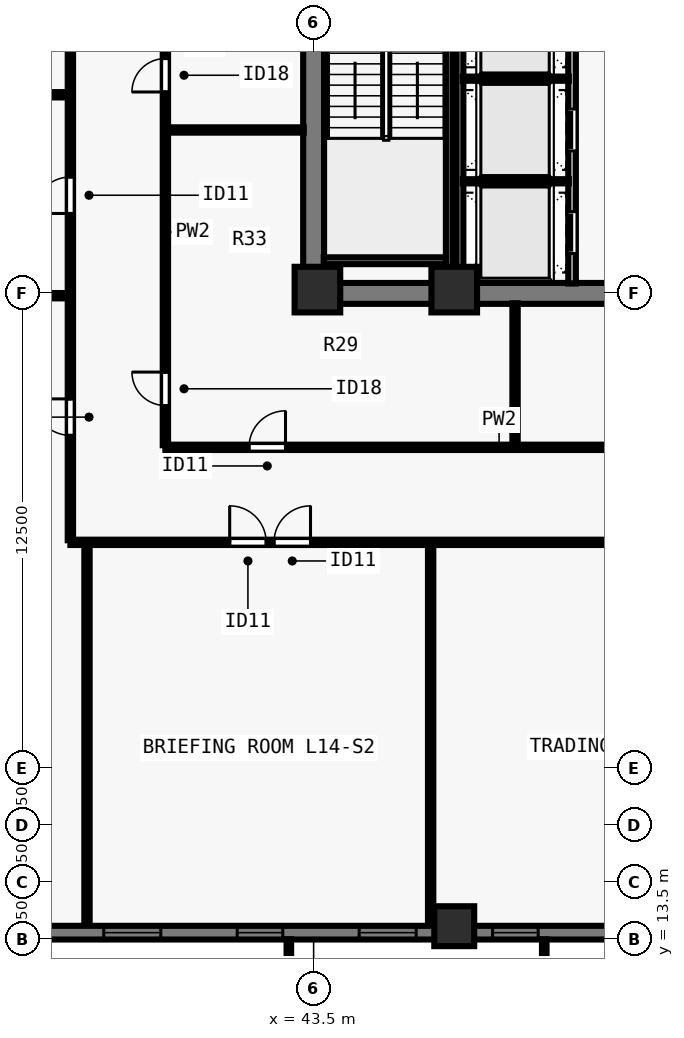
"""IFC4 building model, lengths in metres.
Left out: names, types, materials, properties, quantities, classifications, styles, units other than length and angle.
Written with IfcOpenShell. Run it as: python <this file> out.ifc"""

import sys

from ifc_helpers import new_model, si_unit, direction, frame, frame_2d, origin, origin_2d, place, context, subcontext, project, spatial, rectangle, extrude, element, fill, save


model = new_model("IFC4")
c1 = context("Model", 3, precision=1e-05, world=origin(), true_north=direction((0.0, 1.0)))
c2 = subcontext(c1, "Body", "Model", "MODEL_VIEW")
j1 = project(units=[si_unit("LENGTHUNIT", "METRE"), si_unit("PLANEANGLEUNIT", "RADIAN")], contexts=[c1])
p1 = place(None, origin())
s1 = spatial("IfcSite", under=j1, at=p1, CompositionType="ELEMENT")
p2 = place(p1, origin())
s2 = spatial("IfcBuilding", under=s1, at=p2, CompositionType="ELEMENT")
p3 = place(p2, frame((0.0, 0.0, 55.0)))
s3 = spatial("IfcBuildingStorey", under=s2, at=p3, CompositionType="ELEMENT", Elevation=55.0)
for number, where, z_axis, x_axis in (
    (1, (43.6, 30.6, 0.0), (0.0, 0.0, 1.0), (1.0, 0.0, 0.0)),
    (2, (47.2, 30.6, 0.0), (0.0, 0.0, 1.0), (1.0, 0.0, 0.0)),
):
    element("IfcColumn", number, at=place(p3, frame(where, z_axis=z_axis, x_axis=x_axis)), inside=s3, PredefinedType="COLUMN", context=c2, shape_type="SweptSolid", body=[
        extrude(rectangle(XDim=1.2, YDim=1.2, at=origin_2d()), origin(), (0.0, 0.0, 1.0), 3.5),
    ])
p4 = place(p3, frame((47.2, 13.85, 0.0), z_axis=(0.0, 0.0, 1.0), x_axis=(1.0, 0.0, 0.0)))
e3 = element("IfcColumn", 3, at=p4, inside=s3, PredefinedType="COLUMN", context=c2, shape_type="SweptSolid", body=[
    extrude(rectangle(XDim=1.05, YDim=1.05, at=origin_2d()), origin(), (0.0, 0.0, 1.0), 3.5),
])
p5 = place(p3, frame((74.5, 13.68, 0.0), z_axis=(0.0, 0.0, 1.0), x_axis=(-1.0, 0.0, 0.0)))
e4 = element("IfcWall", 4, at=p5, inside=s3, PredefinedType="SOLIDWALL", context=c2, shape_type="SweptSolid", body=[
    extrude(rectangle(XDim=44.662, YDim=0.36, at=frame_2d((22.331, 0.0))), origin(), (0.0, 0.0, 1.0), 3.28),
])
p6 = place(p5, frame((4.93, 0.0, 0.8)))
e5 = element("IfcOpeningElement", 5, at=p6, cuts=e4, PredefinedType="OPENING", context=c2, shape_type="SweptSolid", body=[
    extrude(rectangle(XDim=1.2, YDim=1.544, at=frame_2d((0.6, 0.772))), frame((0.0, 0.19, 0.0), z_axis=(0.0, -1.0, 0.0), x_axis=(1.0, 0.0, 0.0)), (0.0, 0.0, 1.0), 0.38),
])
p7 = place(p5, frame((8.59, 0.0, 0.8)))
e6 = element("IfcOpeningElement", 6, at=p7, cuts=e4, PredefinedType="OPENING", context=c2, shape_type="SweptSolid", body=[
    extrude(rectangle(XDim=1.5, YDim=1.544, at=frame_2d((0.75, 0.772))), frame((0.0, 0.19, 0.0), z_axis=(0.0, -1.0, 0.0), x_axis=(1.0, 0.0, 0.0)), (0.0, 0.0, 1.0), 0.38),
])
p8 = place(p5, frame((11.65, 0.0, 0.8)))
e7 = element("IfcOpeningElement", 7, at=p8, cuts=e4, PredefinedType="OPENING", context=c2, shape_type="SweptSolid", body=[
    extrude(rectangle(XDim=1.2, YDim=1.544, at=frame_2d((0.6, 0.772))), frame((0.0, 0.19, 0.0), z_axis=(0.0, -1.0, 0.0), x_axis=(1.0, 0.0, 0.0)), (0.0, 0.0, 1.0), 0.38),
])
p9 = place(p5, frame((14.861, 0.0, 0.8)))
e8 = element("IfcOpeningElement", 8, at=p9, cuts=e4, PredefinedType="OPENING", context=c2, shape_type="SweptSolid", body=[
    extrude(rectangle(XDim=1.5, YDim=1.544, at=frame_2d((0.75, 0.772))), frame((0.0, 0.19, 0.0), z_axis=(0.0, -1.0, 0.0), x_axis=(1.0, 0.0, 0.0)), (0.0, 0.0, 1.0), 0.38),
])
p10 = place(p5, frame((18.821, 0.0, 0.8)))
e9 = element("IfcOpeningElement", 9, at=p10, cuts=e4, PredefinedType="OPENING", context=c2, shape_type="SweptSolid", body=[
    extrude(rectangle(XDim=1.2, YDim=1.544, at=frame_2d((0.6, 0.772))), frame((0.0, 0.19, 0.0), z_axis=(0.0, -1.0, 0.0), x_axis=(1.0, 0.0, 0.0)), (0.0, 0.0, 1.0), 0.38),
])
p11 = place(p5, frame((21.581, 0.0, 0.8)))
e10 = element("IfcOpeningElement", 10, at=p11, cuts=e4, PredefinedType="OPENING", context=c2, shape_type="SweptSolid", body=[
    extrude(rectangle(XDim=1.5, YDim=1.544, at=frame_2d((0.75, 0.772))), frame((0.0, 0.19, 0.0), z_axis=(0.0, -1.0, 0.0), x_axis=(1.0, 0.0, 0.0)), (0.0, 0.0, 1.0), 0.38),
])
p12 = place(p5, frame((25.091, 0.0, 0.8)))
e11 = element("IfcOpeningElement", 11, at=p12, cuts=e4, PredefinedType="OPENING", context=c2, shape_type="SweptSolid", body=[
    extrude(rectangle(XDim=1.2, YDim=1.544, at=frame_2d((0.6, 0.772))), frame((0.0, 0.19, 0.0), z_axis=(0.0, -1.0, 0.0), x_axis=(1.0, 0.0, 0.0)), (0.0, 0.0, 1.0), 0.38),
])
p13 = place(p5, frame((28.302, 0.0, 0.8)))
e12 = element("IfcOpeningElement", 12, at=p13, cuts=e4, PredefinedType="OPENING", context=c2, shape_type="SweptSolid", body=[
    extrude(rectangle(XDim=1.5, YDim=1.544, at=frame_2d((0.75, 0.772))), frame((0.0, 0.19, 0.0), z_axis=(0.0, -1.0, 0.0), x_axis=(1.0, 0.0, 0.0)), (0.0, 0.0, 1.0), 0.38),
])
p14 = place(p5, frame((31.812, 0.0, 0.8)))
e13 = element("IfcOpeningElement", 13, at=p14, cuts=e4, PredefinedType="OPENING", context=c2, shape_type="SweptSolid", body=[
    extrude(rectangle(XDim=1.2, YDim=1.544, at=frame_2d((0.6, 0.772))), frame((0.0, 0.19, 0.0), z_axis=(0.0, -1.0, 0.0), x_axis=(1.0, 0.0, 0.0)), (0.0, 0.0, 1.0), 0.38),
])
p15 = place(p5, frame((35.022, 0.0, 0.8)))
e14 = element("IfcOpeningElement", 14, at=p15, cuts=e4, PredefinedType="OPENING", context=c2, shape_type="SweptSolid", body=[
    extrude(rectangle(XDim=1.5, YDim=1.544, at=frame_2d((0.75, 0.772))), frame((0.0, 0.19, 0.0), z_axis=(0.0, -1.0, 0.0), x_axis=(1.0, 0.0, 0.0)), (0.0, 0.0, 1.0), 0.38),
])
p16 = place(p5, frame((38.532, 0.0, 0.8)))
e15 = element("IfcOpeningElement", 15, at=p16, cuts=e4, PredefinedType="OPENING", context=c2, shape_type="SweptSolid", body=[
    extrude(rectangle(XDim=1.2, YDim=1.544, at=frame_2d((0.6, 0.772))), frame((0.0, 0.19, 0.0), z_axis=(0.0, -1.0, 0.0), x_axis=(1.0, 0.0, 0.0)), (0.0, 0.0, 1.0), 0.38),
])
p17 = place(p3, frame((43.225, 30.5, 0.0), z_axis=(0.0, 0.0, 1.0), x_axis=(1.0, 0.0, 0.0)))
e16 = element("IfcWall", 16, at=p17, inside=s3, PredefinedType="SHEAR", context=c2, shape_type="SweptSolid", body=[
    extrude(rectangle(XDim=17.55, YDim=0.55, at=frame_2d((8.775, 0.0))), origin(), (0.0, 0.0, 1.0), 3.28),
])
p18 = place(p3, frame((43.5, 30.765, 0.0), z_axis=(0.0, 0.0, 1.0), x_axis=(0.0, 1.0, 0.0)))
e17 = element("IfcWall", 17, at=p18, inside=s3, PredefinedType="SHEAR", context=c2, shape_type="SweptSolid", body=[
    extrude(rectangle(XDim=7.985, YDim=0.55, at=frame_2d((3.993, 0.0))), origin(), (0.0, 0.0, 1.0), 3.28),
])
p19 = place(p3, frame((50.3, 30.76, 0.0), z_axis=(0.0, 0.0, 1.0), x_axis=(0.0, 1.0, 0.0)))
e18 = element("IfcWall", 18, at=p19, inside=s3, PredefinedType="SOLIDWALL", context=c2, shape_type="SweptSolid", body=[
    extrude(rectangle(XDim=7.855, YDim=0.2, at=frame_2d((3.927, 0.0))), origin(), (0.0, 0.0, 1.0), 3.28),
])
p20 = place(p19, frame((0.79, 0.0, 0.0)))
e19 = element("IfcOpeningElement", 19, at=p20, cuts=e18, PredefinedType="OPENING", context=c2, shape_type="SweptSolid", body=[
    extrude(rectangle(XDim=1.1, YDim=2.2, at=frame_2d((0.55, 1.1))), frame((0.0, 0.11, 0.0), z_axis=(0.0, -1.0, 0.0), x_axis=(1.0, 0.0, 0.0)), (0.0, 0.0, 1.0), 0.22),
])
p21 = place(p19, frame((3.49, 0.0, 0.0)))
e20 = element("IfcOpeningElement", 20, at=p21, cuts=e18, PredefinedType="OPENING", context=c2, shape_type="SweptSolid", body=[
    extrude(rectangle(XDim=1.1, YDim=2.2, at=frame_2d((0.55, 1.1))), frame((0.0, 0.11, 0.0), z_axis=(0.0, -1.0, 0.0), x_axis=(1.0, 0.0, 0.0)), (0.0, 0.0, 1.0), 0.22),
])
p22 = place(p19, frame((6.19, 0.0, 0.0)))
e21 = element("IfcOpeningElement", 21, at=p22, cuts=e18, PredefinedType="OPENING", context=c2, shape_type="SweptSolid", body=[
    extrude(rectangle(XDim=1.1, YDim=2.2, at=frame_2d((0.55, 1.1))), frame((0.0, 0.11, 0.0), z_axis=(0.0, -1.0, 0.0), x_axis=(1.0, 0.0, 0.0)), (0.0, 0.0, 1.0), 0.22),
])
p23 = place(p3, frame((47.35, 30.76, 0.0), z_axis=(0.0, 0.0, 1.0), x_axis=(0.0, 1.0, 0.0)))
e22 = element("IfcWall", 22, at=p23, inside=s3, PredefinedType="SOLIDWALL", context=c2, shape_type="SweptSolid", body=[
    extrude(rectangle(XDim=7.855, YDim=0.18, at=frame_2d((3.927, 0.0))), origin(), (0.0, 0.0, 1.0), 3.28),
])
for number, where, z_axis, x_axis in (
    (23, (47.425, 33.45, 0.0), (0.0, 0.0, 1.0), (1.0, 0.0, 0.0)),
    (24, (47.425, 36.15, 0.0), (0.0, 0.0, 1.0), (1.0, 0.0, 0.0)),
):
    element("IfcWall", number, at=place(p3, frame(where, z_axis=z_axis, x_axis=x_axis)), inside=s3, PredefinedType="PARTITIONING", context=c2, shape_type="SweptSolid", body=[
        extrude(rectangle(XDim=2.79, YDim=0.11, at=frame_2d((1.395, 0.0))), origin(), (0.0, 0.0, 1.0), 3.28),
    ])
p24 = place(p3, frame((37.1, 23.95, 0.0), z_axis=(0.0, 0.0, 1.0), x_axis=(1.0, 0.0, 0.0)))
e25 = element("IfcWall", 25, at=p24, inside=s3, PredefinedType="PARTITIONING", context=c2, shape_type="SweptSolid", body=[
    extrude(rectangle(XDim=29.8, YDim=0.14, at=frame_2d((14.9, 0.0))), origin(), (0.0, 0.0, 1.0), 3.28),
])
p25 = place(p24, frame((4.191, 0.0, 0.0)))
e26 = element("IfcOpeningElement", 26, at=p25, cuts=e25, PredefinedType="OPENING", context=c2, shape_type="SweptSolid", body=[
    extrude(rectangle(XDim=0.96, YDim=2.12, at=frame_2d((0.48, 1.06))), frame((0.0, 0.08, 0.0), z_axis=(0.0, -1.0, 0.0), x_axis=(1.0, 0.0, 0.0)), (0.0, 0.0, 1.0), 0.16),
])
p26 = place(p24, frame((5.358, 0.0, 0.0)))
e27 = element("IfcOpeningElement", 27, at=p26, cuts=e25, PredefinedType="OPENING", context=c2, shape_type="SweptSolid", body=[
    extrude(rectangle(XDim=0.96, YDim=2.12, at=frame_2d((0.48, 1.06))), frame((0.0, 0.08, 0.0), z_axis=(0.0, -1.0, 0.0), x_axis=(1.0, 0.0, 0.0)), (0.0, 0.0, 1.0), 0.16),
])
p27 = place(p24, frame((14.51, 0.0, 0.0)))
e28 = element("IfcOpeningElement", 28, at=p27, cuts=e25, PredefinedType="OPENING", context=c2, shape_type="SweptSolid", body=[
    extrude(rectangle(XDim=0.96, YDim=2.12, at=frame_2d((0.48, 1.06))), frame((0.0, 0.08, 0.0), z_axis=(0.0, -1.0, 0.0), x_axis=(1.0, 0.0, 0.0)), (0.0, 0.0, 1.0), 0.16),
])
p28 = place(p24, frame((24.542, 0.0, 0.0)))
e29 = element("IfcOpeningElement", 29, at=p28, cuts=e25, PredefinedType="OPENING", context=c2, shape_type="SweptSolid", body=[
    extrude(rectangle(XDim=0.96, YDim=2.12, at=frame_2d((0.48, 1.06))), frame((0.0, 0.08, 0.0), z_axis=(0.0, -1.0, 0.0), x_axis=(1.0, 0.0, 0.0)), (0.0, 0.0, 1.0), 0.16),
])
p29 = place(p24, frame((28.26, 0.0, 0.0)))
e30 = element("IfcOpeningElement", 30, at=p29, cuts=e25, PredefinedType="OPENING", context=c2, shape_type="SweptSolid", body=[
    extrude(rectangle(XDim=0.96, YDim=2.12, at=frame_2d((0.48, 1.06))), frame((0.0, 0.08, 0.0), z_axis=(0.0, -1.0, 0.0), x_axis=(1.0, 0.0, 0.0)), (0.0, 0.0, 1.0), 0.16),
])
p30 = place(p3, frame((37.1, 24.005, 0.0), z_axis=(0.0, 0.0, 1.0), x_axis=(0.0, 1.0, 0.0)))
e31 = element("IfcWall", 31, at=p30, inside=s3, PredefinedType="PARTITIONING", context=c2, shape_type="SweptSolid", body=[
    extrude(rectangle(XDim=29.99, YDim=0.14, at=frame_2d((14.995, 0.0))), origin(), (0.0, 0.0, 1.0), 3.28),
])
p31 = place(p30, frame((2.76, 0.0, 0.0)))
e32 = element("IfcOpeningElement", 32, at=p31, cuts=e31, PredefinedType="OPENING", context=c2, shape_type="SweptSolid", body=[
    extrude(rectangle(XDim=0.96, YDim=2.12, at=frame_2d((0.48, 1.06))), frame((0.0, 0.08, 0.0), z_axis=(0.0, -1.0, 0.0), x_axis=(1.0, 0.0, 0.0)), (0.0, 0.0, 1.0), 0.16),
])
p32 = place(p30, frame((8.598, 0.0, 0.0)))
e33 = element("IfcOpeningElement", 33, at=p32, cuts=e31, PredefinedType="OPENING", context=c2, shape_type="SweptSolid", body=[
    extrude(rectangle(XDim=0.96, YDim=2.12, at=frame_2d((0.48, 1.06))), frame((0.0, 0.08, 0.0), z_axis=(0.0, -1.0, 0.0), x_axis=(1.0, 0.0, 0.0)), (0.0, 0.0, 1.0), 0.16),
])
p33 = place(p30, frame((14.578, 0.0, 0.0)))
e34 = element("IfcOpeningElement", 34, at=p33, cuts=e31, PredefinedType="OPENING", context=c2, shape_type="SweptSolid", body=[
    extrude(rectangle(XDim=0.96, YDim=2.12, at=frame_2d((0.48, 1.06))), frame((0.0, 0.08, 0.0), z_axis=(0.0, -1.0, 0.0), x_axis=(1.0, 0.0, 0.0)), (0.0, 0.0, 1.0), 0.16),
])
p34 = place(p30, frame((20.558, 0.0, 0.0)))
e35 = element("IfcOpeningElement", 35, at=p34, cuts=e31, PredefinedType="OPENING", context=c2, shape_type="SweptSolid", body=[
    extrude(rectangle(XDim=0.96, YDim=2.12, at=frame_2d((0.48, 1.06))), frame((0.0, 0.08, 0.0), z_axis=(0.0, -1.0, 0.0), x_axis=(1.0, 0.0, 0.0)), (0.0, 0.0, 1.0), 0.16),
])
p35 = place(p30, frame((26.333, 0.0, 0.0)))
e36 = element("IfcOpeningElement", 36, at=p35, cuts=e31, PredefinedType="OPENING", context=c2, shape_type="SweptSolid", body=[
    extrude(rectangle(XDim=0.96, YDim=2.12, at=frame_2d((0.48, 1.06))), frame((0.0, 0.08, 0.0), z_axis=(0.0, -1.0, 0.0), x_axis=(1.0, 0.0, 0.0)), (0.0, 0.0, 1.0), 0.16),
])
p36 = place(p3, frame((39.6, 26.45, 0.0), z_axis=(0.0, 0.0, 1.0), x_axis=(1.0, 0.0, 0.0)))
e37 = element("IfcWall", 37, at=p36, inside=s3, PredefinedType="PARTITIONING", context=c2, shape_type="SweptSolid", body=[
    extrude(rectangle(XDim=24.8, YDim=0.14, at=frame_2d((12.4, 0.0))), origin(), (0.0, 0.0, 1.0), 3.28),
])
p37 = place(p36, frame((2.2, 0.0, 0.0)))
e38 = element("IfcOpeningElement", 38, at=p37, cuts=e37, PredefinedType="OPENING", context=c2, shape_type="SweptSolid", body=[
    extrude(rectangle(XDim=0.96, YDim=2.12, at=frame_2d((0.48, 1.06))), frame((0.0, 0.08, 0.0), z_axis=(0.0, -1.0, 0.0), x_axis=(1.0, 0.0, 0.0)), (0.0, 0.0, 1.0), 0.16),
])
p38 = place(p36, frame((14.4, 0.0, 0.0)))
e39 = element("IfcOpeningElement", 39, at=p38, cuts=e37, PredefinedType="OPENING", context=c2, shape_type="SweptSolid", body=[
    extrude(rectangle(XDim=0.96, YDim=2.12, at=frame_2d((0.48, 1.06))), frame((0.0, 0.08, 0.0), z_axis=(0.0, -1.0, 0.0), x_axis=(1.0, 0.0, 0.0)), (0.0, 0.0, 1.0), 0.16),
])
p39 = place(p3, frame((39.6, 26.505, 0.0), z_axis=(0.0, 0.0, 1.0), x_axis=(0.0, 1.0, 0.0)))
e40 = element("IfcWall", 40, at=p39, inside=s3, PredefinedType="PARTITIONING", context=c2, shape_type="SweptSolid", body=[
    extrude(rectangle(XDim=12.245, YDim=0.14, at=frame_2d((6.123, 0.0))), origin(), (0.0, 0.0, 1.0), 3.28),
])
p40 = place(p39, frame((1.045, 0.0, 0.0)))
e41 = element("IfcOpeningElement", 41, at=p40, cuts=e40, PredefinedType="OPENING", context=c2, shape_type="SweptSolid", body=[
    extrude(rectangle(XDim=0.88, YDim=2.1, at=frame_2d((0.44, 1.05))), frame((0.0, 0.08, 0.0), z_axis=(0.0, -1.0, 0.0), x_axis=(1.0, 0.0, 0.0)), (0.0, 0.0, 1.0), 0.16),
])
p41 = place(p39, frame((9.295, 0.0, 0.0)))
e42 = element("IfcOpeningElement", 42, at=p41, cuts=e40, PredefinedType="OPENING", context=c2, shape_type="SweptSolid", body=[
    extrude(rectangle(XDim=0.88, YDim=2.1, at=frame_2d((0.44, 1.05))), frame((0.0, 0.08, 0.0), z_axis=(0.0, -1.0, 0.0), x_axis=(1.0, 0.0, 0.0)), (0.0, 0.0, 1.0), 0.16),
])
p42 = place(p3, frame((48.8, 26.505, 0.0), z_axis=(0.0, 0.0, 1.0), x_axis=(0.0, 1.0, 0.0)))
e43 = element("IfcWall", 43, at=p42, inside=s3, PredefinedType="PARTITIONING", context=c2, shape_type="SweptSolid", body=[
    extrude(rectangle(XDim=3.735, YDim=0.14, at=frame_2d((1.868, 0.0))), origin(), (0.0, 0.0, 1.0), 3.28),
])
p43 = place(p3, frame((39.655, 34.8, 0.0), z_axis=(0.0, 0.0, 1.0), x_axis=(1.0, 0.0, 0.0)))
e44 = element("IfcWall", 44, at=p43, inside=s3, PredefinedType="PARTITIONING", context=c2, shape_type="SweptSolid", body=[
    extrude(rectangle(XDim=3.585, YDim=0.14, at=frame_2d((1.792, 0.0))), origin(), (0.0, 0.0, 1.0), 3.28),
])
p44 = place(p3, frame((37.537, 13.92, 0.0), z_axis=(0.0, 0.0, 1.0), x_axis=(0.0, 1.0, 0.0)))
e45 = element("IfcWall", 45, at=p44, inside=s3, PredefinedType="PARTITIONING", context=c2, shape_type="SweptSolid", body=[
    extrude(rectangle(XDim=9.93, YDim=0.14, at=frame_2d((4.965, 0.0))), origin(), (0.0, 0.0, 1.0), 2.439),
])
p45 = place(p3, frame((46.579, 13.92, 0.0), z_axis=(0.0, 0.0, 1.0), x_axis=(0.0, 1.0, 0.0)))
e46 = element("IfcWall", 46, at=p45, inside=s3, PredefinedType="PARTITIONING", context=c2, shape_type="SweptSolid", body=[
    extrude(rectangle(XDim=9.93, YDim=0.14, at=frame_2d((4.965, 0.0))), origin(), (0.0, 0.0, 1.0), 3.28),
])
p46 = place(p3, frame((26.92, 30.439, 0.0), z_axis=(0.0, 0.0, 1.0), x_axis=(1.0, 0.0, 0.0)))
e47 = element("IfcWall", 47, at=p46, inside=s3, PredefinedType="PARTITIONING", context=c2, shape_type="SweptSolid", body=[
    extrude(rectangle(XDim=10.08, YDim=0.14, at=frame_2d((5.04, 0.0))), origin(), (0.0, 0.0, 1.0), 3.28),
])
p47 = place(p3, frame((26.92, 35.727, 0.0), z_axis=(0.0, 0.0, 1.0), x_axis=(1.0, 0.0, 0.0)))
e48 = element("IfcWall", 48, at=p47, inside=s3, PredefinedType="PARTITIONING", context=c2, shape_type="SweptSolid", body=[
    extrude(rectangle(XDim=10.08, YDim=0.14, at=frame_2d((5.04, 0.0))), origin(), (0.0, 0.0, 1.0), 2.849),
])
p48 = place(p3, frame((43.765, 31.36, 0.0), z_axis=(0.0, 0.0, 1.0), x_axis=(1.0, 0.0, 0.0)))
e49 = element("IfcWall", 49, at=p48, inside=s3, PredefinedType="SOLIDWALL", context=c2, shape_type="SweptSolid", body=[
    extrude(rectangle(XDim=3.23, YDim=0.18, at=frame_2d((1.615, 0.0))), origin(), (0.0, 0.0, 1.0), 3.28),
])
p49 = place(p3, frame((47.07, 38.78, 0.0), z_axis=(0.0, 0.0, 1.0), x_axis=(0.0, -1.0, 0.0)))
e50 = element("IfcWall", 50, at=p49, inside=s3, PredefinedType="SOLIDWALL", context=c2, shape_type="SweptSolid", body=[
    extrude(rectangle(XDim=8.017, YDim=0.18, at=frame_2d((4.009, 0.0))), origin(), (0.0, 0.0, 1.0), 3.28),
])
p50 = place(p12, origin())
e51 = element("IfcWindow", 51, at=p50, inside=s3, PartitioningType="SINGLE_PANEL", PredefinedType="WINDOW", context=c2, shape_type="SweptSolid", body=[
    extrude(rectangle(XDim=1.2, YDim=1.544, at=frame_2d((0.6, 0.772))), frame((0.0, -0.05, 0.0), z_axis=(0.0, -1.0, 0.0), x_axis=(1.0, 0.0, 0.0)), (0.0, 0.0, 1.0), 0.06),
])
fill(e11, e51)
p51 = place(p13, origin())
e52 = element("IfcWindow", 52, at=p51, inside=s3, PartitioningType="SINGLE_PANEL", PredefinedType="WINDOW", context=c2, shape_type="SweptSolid", body=[
    extrude(rectangle(XDim=1.5, YDim=1.544, at=frame_2d((0.75, 0.772))), frame((0.0, -0.05, 0.0), z_axis=(0.0, -1.0, 0.0), x_axis=(1.0, 0.0, 0.0)), (0.0, 0.0, 1.0), 0.06),
])
fill(e12, e52)
p52 = place(p14, origin())
e53 = element("IfcWindow", 53, at=p52, inside=s3, PartitioningType="SINGLE_PANEL", PredefinedType="WINDOW", context=c2, shape_type="SweptSolid", body=[
    extrude(rectangle(XDim=1.2, YDim=1.544, at=frame_2d((0.6, 0.772))), frame((0.0, -0.05, 0.0), z_axis=(0.0, -1.0, 0.0), x_axis=(1.0, 0.0, 0.0)), (0.0, 0.0, 1.0), 0.06),
])
fill(e13, e53)
p53 = place(p15, origin())
e54 = element("IfcWindow", 54, at=p53, inside=s3, PartitioningType="SINGLE_PANEL", PredefinedType="WINDOW", context=c2, shape_type="SweptSolid", body=[
    extrude(rectangle(XDim=1.5, YDim=1.544, at=frame_2d((0.75, 0.772))), frame((0.0, -0.05, 0.0), z_axis=(0.0, -1.0, 0.0), x_axis=(1.0, 0.0, 0.0)), (0.0, 0.0, 1.0), 0.06),
])
fill(e14, e54)
p54 = place(p20, origin())
e55 = element("IfcDoor", 55, at=p54, inside=s3, OperationType="SLIDING_TO_LEFT", PredefinedType="DOOR", context=c2, shape_type="SweptSolid", body=[
    extrude(rectangle(XDim=1.1, YDim=2.2, at=frame_2d((0.55, 1.1))), frame((0.0, 0.025, 0.0), z_axis=(0.0, -1.0, 0.0), x_axis=(1.0, 0.0, 0.0)), (0.0, 0.0, 1.0), 0.05),
])
fill(e19, e55)
p55 = place(p21, origin())
e56 = element("IfcDoor", 56, at=p55, inside=s3, OperationType="SLIDING_TO_LEFT", PredefinedType="DOOR", context=c2, shape_type="SweptSolid", body=[
    extrude(rectangle(XDim=1.1, YDim=2.2, at=frame_2d((0.55, 1.1))), frame((0.0, 0.025, 0.0), z_axis=(0.0, -1.0, 0.0), x_axis=(1.0, 0.0, 0.0)), (0.0, 0.0, 1.0), 0.05),
])
fill(e20, e56)
p56 = place(p37, origin())
e57 = element("IfcDoor", 57, at=p56, inside=s3, OperationType="SINGLE_SWING_RIGHT", PredefinedType="DOOR", context=c2, shape_type="SweptSolid", body=[
    extrude(rectangle(XDim=0.96, YDim=2.12, at=frame_2d((0.48, 1.06))), frame((0.0, 0.025, 0.0), z_axis=(0.0, -1.0, 0.0), x_axis=(1.0, 0.0, 0.0)), (0.0, 0.0, 1.0), 0.05),
])
fill(e38, e57)
p57 = place(p40, origin())
e58 = element("IfcDoor", 58, at=p57, inside=s3, OperationType="SINGLE_SWING_RIGHT", PredefinedType="DOOR", context=c2, shape_type="SweptSolid", body=[
    extrude(rectangle(XDim=0.88, YDim=2.1, at=frame_2d((0.44, 1.05))), frame((0.0, 0.025, 0.0), z_axis=(0.0, -1.0, 0.0), x_axis=(1.0, 0.0, 0.0)), (0.0, 0.0, 1.0), 0.05),
])
fill(e41, e58)
p58 = place(p41, origin())
e59 = element("IfcDoor", 59, at=p58, inside=s3, OperationType="SINGLE_SWING_LEFT", PredefinedType="DOOR", context=c2, shape_type="SweptSolid", body=[
    extrude(rectangle(XDim=0.88, YDim=2.1, at=frame_2d((0.44, 1.05))), frame((0.0, 0.025, 0.0), z_axis=(0.0, -1.0, 0.0), x_axis=(1.0, 0.0, 0.0)), (0.0, 0.0, 1.0), 0.05),
])
fill(e42, e59)
p59 = place(p25, origin())
e60 = element("IfcDoor", 60, at=p59, inside=s3, OperationType="SINGLE_SWING_LEFT", PredefinedType="DOOR", context=c2, shape_type="SweptSolid", body=[
    extrude(rectangle(XDim=0.96, YDim=2.12, at=frame_2d((0.48, 1.06))), frame((0.0, 0.025, 0.0), z_axis=(0.0, -1.0, 0.0), x_axis=(1.0, 0.0, 0.0)), (0.0, 0.0, 1.0), 0.05),
])
fill(e26, e60)
p60 = place(p26, origin())
e61 = element("IfcDoor", 61, at=p60, inside=s3, OperationType="SINGLE_SWING_RIGHT", PredefinedType="DOOR", context=c2, shape_type="SweptSolid", body=[
    extrude(rectangle(XDim=0.96, YDim=2.12, at=frame_2d((0.48, 1.06))), frame((0.0, 0.025, 0.0), z_axis=(0.0, -1.0, 0.0), x_axis=(1.0, 0.0, 0.0)), (0.0, 0.0, 1.0), 0.05),
])
fill(e27, e61)
p61 = place(p31, origin())
e62 = element("IfcDoor", 62, at=p61, inside=s3, OperationType="SINGLE_SWING_RIGHT", PredefinedType="DOOR", context=c2, shape_type="SweptSolid", body=[
    extrude(rectangle(XDim=0.96, YDim=2.12, at=frame_2d((0.48, 1.06))), frame((0.0, 0.025, 0.0), z_axis=(0.0, -1.0, 0.0), x_axis=(1.0, 0.0, 0.0)), (0.0, 0.0, 1.0), 0.05),
])
fill(e32, e62)
p62 = place(p32, origin())
e63 = element("IfcDoor", 63, at=p62, inside=s3, OperationType="SINGLE_SWING_LEFT", PredefinedType="DOOR", context=c2, shape_type="SweptSolid", body=[
    extrude(rectangle(XDim=0.96, YDim=2.12, at=frame_2d((0.48, 1.06))), frame((0.0, 0.025, 0.0), z_axis=(0.0, -1.0, 0.0), x_axis=(1.0, 0.0, 0.0)), (0.0, 0.0, 1.0), 0.05),
])
fill(e33, e63)
save(model, sys.argv[1])
